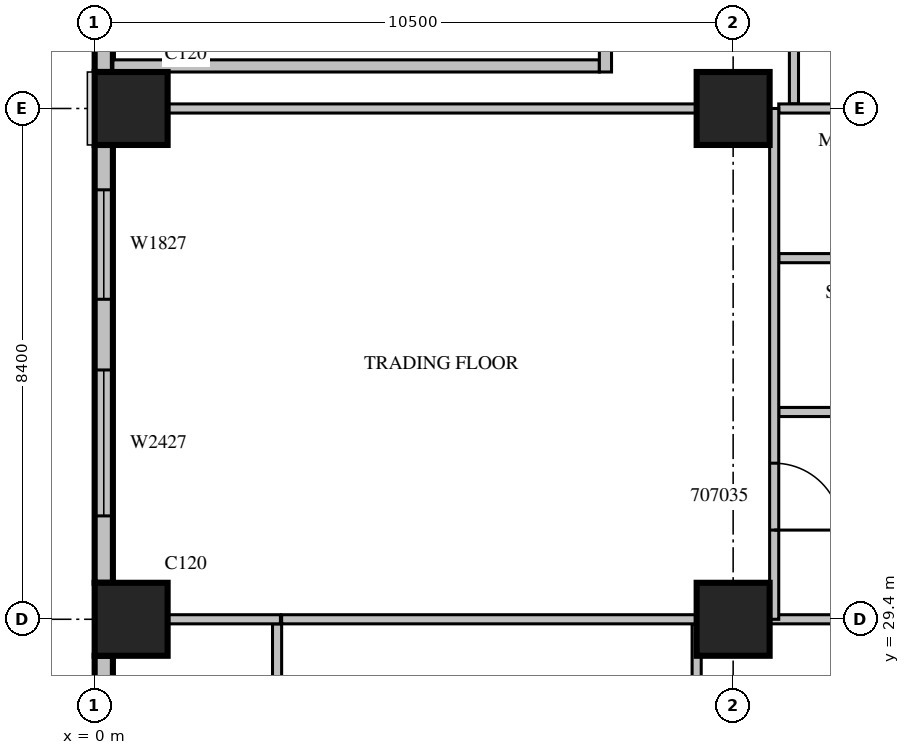
"""IFC4 building model, lengths in metres.
Left out: names, types, materials, properties, quantities, classifications, styles, units other than length and angle.
Written with IfcOpenShell. Run it as: python <this file> out.ifc"""

import sys

from ifc_helpers import new_model, si_unit, direction, frame, frame_2d, origin, origin_2d, place, context, subcontext, project, spatial, rectangle, extrude, source, transform, mapped, element, fill, save


model = new_model("IFC4")
c1 = context("Model", 3, precision=1e-05, world=origin(), true_north=direction((0.0, 1.0)))
c2 = subcontext(c1, "Body", "Model", "MODEL_VIEW")
j1 = project(units=[si_unit("LENGTHUNIT", "METRE"), si_unit("PLANEANGLEUNIT", "RADIAN")], contexts=[c1])
p1 = place(None, origin())
s1 = spatial("IfcSite", under=j1, at=p1, CompositionType="ELEMENT")
p2 = place(p1, origin())
s2 = spatial("IfcBuilding", under=s1, at=p2, CompositionType="ELEMENT")
p3 = place(p2, frame((0.0, 0.0, 40.5)))
s3 = spatial("IfcBuildingStorey", under=s2, at=p3, CompositionType="ELEMENT", Elevation=40.5)
m1 = source(origin(), c2, "Body", "SweptSolid", [
    extrude(rectangle(XDim=1.2, YDim=1.2, at=origin_2d()), origin(), (0.0, 0.0, 1.0), 4.2),
])
for number, where, z_axis, x_axis in (
    (1, (0.6, 29.4, 0.0), (0.0, 0.0, 1.0), (1.0, 0.0, 0.0)),
    (2, (10.5, 29.4, 0.0), (0.0, 0.0, 1.0), (1.0, 0.0, 0.0)),
    (3, (0.6, 37.8, 0.0), (0.0, 0.0, 1.0), (1.0, 0.0, 0.0)),
    (4, (10.5, 37.8, 0.0), (0.0, 0.0, 1.0), (1.0, 0.0, 0.0)),
):
    element("IfcColumn", number, at=place(p3, frame(where, z_axis=z_axis, x_axis=x_axis)), inside=s3, PredefinedType="COLUMN", context=c2, shape_type="MappedRepresentation", body=[
        mapped(m1, transform((0.0, 0.0, 0.0), scale=1.0)),
    ])
m2 = source(origin(), c2, "Body", "SweptSolid", [
    extrude(rectangle(XDim=1.8, YDim=0.3, at=frame_2d((0.9, 0.0))), origin(), (0.0, 0.0, 1.0), 3.8),
])
p4 = place(p3, frame((0.15, 40.2, 0.0), z_axis=(0.0, 0.0, 1.0), x_axis=(0.0, -1.0, 0.0)))
e5 = element("IfcWall", 5, at=p4, inside=s3, PredefinedType="STANDARD", context=c2, shape_type="MappedRepresentation", body=[
    mapped(m2, transform((0.0, 0.0, 0.0), scale=1.0)),
])
m3 = source(origin(), c2, "Body", "SweptSolid", [
    extrude(rectangle(XDim=7.2, YDim=0.3, at=frame_2d((3.6, 0.0))), origin(), (0.0, 0.0, 1.0), 3.8),
])
p5 = place(p3, frame((0.15, 37.2, 0.0), z_axis=(0.0, 0.0, 1.0), x_axis=(0.0, -1.0, 0.0)))
e6 = element("IfcWall", 6, at=p5, inside=s3, PredefinedType="STANDARD", context=c2, shape_type="MappedRepresentation", body=[
    mapped(m3, transform((0.0, 0.0, 0.0), scale=1.0)),
])
m4 = source(origin(), c2, "Body", "SweptSolid", [
    extrude(rectangle(XDim=1.8, YDim=2.7, at=frame_2d((0.9, 1.35))), frame((0.0, 0.16, 0.0), z_axis=(0.0, -1.0, 0.0), x_axis=(1.0, 0.0, 0.0)), (0.0, 0.0, 1.0), 0.32),
])
p6 = place(p5, frame((0.738, 0.0, 0.6)))
e7 = element("IfcOpeningElement", 7, at=p6, cuts=e6, PredefinedType="OPENING", context=c2, shape_type="MappedRepresentation", body=[
    mapped(m4, transform((0.0, 0.0, 0.0), scale=1.0)),
])
m5 = source(origin(), c2, "Body", "SweptSolid", [
    extrude(rectangle(XDim=2.4, YDim=2.7, at=frame_2d((1.2, 1.35))), frame((0.0, 0.16, 0.0), z_axis=(0.0, -1.0, 0.0), x_axis=(1.0, 0.0, 0.0)), (0.0, 0.0, 1.0), 0.32),
])
p7 = place(p5, frame((3.7, 0.0, 0.6)))
e8 = element("IfcOpeningElement", 8, at=p7, cuts=e6, PredefinedType="OPENING", context=c2, shape_type="MappedRepresentation", body=[
    mapped(m5, transform((0.0, 0.0, 0.0), scale=1.0)),
])
p8 = place(p3, frame((0.15, 28.8, 0.0), z_axis=(0.0, 0.0, 1.0), x_axis=(0.0, -1.0, 0.0)))
e9 = element("IfcWall", 9, at=p8, inside=s3, PredefinedType="STANDARD", context=c2, shape_type="SweptSolid", body=[
    extrude(rectangle(XDim=7.2, YDim=0.3, at=frame_2d((3.6, 0.0))), origin(), (0.0, 0.0, 1.0), 3.3),
])
m6 = source(origin(), c2, "Body", "SweptSolid", [
    extrude(rectangle(XDim=3.0, YDim=2.7, at=frame_2d((1.5, 1.35))), frame((0.0, 0.16, 0.0), z_axis=(0.0, -1.0, 0.0), x_axis=(1.0, 0.0, 0.0)), (0.0, 0.0, 1.0), 0.32),
])
p9 = place(p8, frame((1.68, 0.0, 0.6)))
e10 = element("IfcOpeningElement", 10, at=p9, cuts=e9, PredefinedType="OPENING", context=c2, shape_type="MappedRepresentation", body=[
    mapped(m6, transform((0.0, 0.0, 0.0), scale=1.0)),
])
m7 = source(origin(), c2, "Body", "SweptSolid", [
    extrude(rectangle(XDim=8.0, YDim=0.2, at=frame_2d((4.0, 0.0))), origin(), (0.0, 0.0, 1.0), 3.8),
])
p10 = place(p3, frame((0.3, 38.5, 0.0), z_axis=(0.0, 0.0, 1.0), x_axis=(1.0, 0.0, 0.0)))
e11 = element("IfcWall", 11, at=p10, inside=s3, PredefinedType="PARTITIONING", context=c2, shape_type="MappedRepresentation", body=[
    mapped(m7, transform((0.0, 0.0, 0.0), scale=1.0)),
])
m8 = source(origin(), c2, "Body", "SweptSolid", [
    extrude(rectangle(XDim=5.45, YDim=0.2, at=frame_2d((2.725, 0.0))), origin(), (0.0, 0.0, 1.0), 3.8),
])
p11 = place(p3, frame((8.4, 38.4, 0.0), z_axis=(0.0, 0.0, 1.0), x_axis=(0.0, 1.0, 0.0)))
e12 = element("IfcWall", 12, at=p11, inside=s3, PredefinedType="PARTITIONING", context=c2, shape_type="MappedRepresentation", body=[
    mapped(m8, transform((0.0, 0.0, 0.0), scale=1.0)),
])
m9 = source(origin(), c2, "Body", "SweptSolid", [
    extrude(rectangle(XDim=1.2, YDim=2.1, at=frame_2d((0.6, 1.05))), frame((0.0, 0.11, 0.0), z_axis=(0.0, -1.0, 0.0), x_axis=(1.0, 0.0, 0.0)), (0.0, 0.0, 1.0), 0.22),
])
p12 = place(p11, frame((0.4, 0.0, 0.0)))
e13 = element("IfcOpeningElement", 13, at=p12, cuts=e12, PredefinedType="OPENING", context=c2, shape_type="MappedRepresentation", body=[
    mapped(m9, transform((0.0, 0.0, 0.0), scale=1.0)),
])
m10 = source(origin(), c2, "Body", "SweptSolid", [
    extrude(rectangle(XDim=0.9, YDim=2.1, at=frame_2d((0.45, 1.05))), frame((0.0, 0.11, 0.0), z_axis=(0.0, -1.0, 0.0), x_axis=(1.0, 0.0, 0.0)), (0.0, 0.0, 1.0), 0.22),
])
p13 = place(p11, frame((3.25, 0.0, 0.0)))
e14 = element("IfcOpeningElement", 14, at=p13, cuts=e12, PredefinedType="OPENING", context=c2, shape_type="MappedRepresentation", body=[
    mapped(m10, transform((0.0, 0.0, 0.0), scale=1.0)),
])
p14 = place(p3, frame((9.9, 24.175, 0.0), z_axis=(0.0, 0.0, 1.0), x_axis=(0.0, 1.0, 0.0)))
e15 = element("IfcWall", 15, at=p14, inside=s3, PredefinedType="PARTITIONING", context=c2, shape_type="SweptSolid", body=[
    extrude(rectangle(XDim=5.15, YDim=0.15, at=frame_2d((2.575, 0.0))), origin(), (0.0, 0.0, 1.0), 3.3),
])
m11 = source(origin(), c2, "Body", "SweptSolid", [
    extrude(rectangle(XDim=6.826, YDim=0.15, at=frame_2d((3.413, 0.0))), origin(), (0.0, 0.0, 1.0), 3.8),
])
p15 = place(p3, frame((9.901, 29.4, 0.0), z_axis=(0.0, 0.0, 1.0), x_axis=(-1.0, 0.0, 0.0)))
e16 = element("IfcWall", 16, at=p15, inside=s3, PredefinedType="PARTITIONING", context=c2, shape_type="MappedRepresentation", body=[
    mapped(m11, transform((0.0, 0.0, 0.0), scale=1.0)),
])
m12 = source(origin(), c2, "Body", "SweptSolid", [
    extrude(rectangle(XDim=3.901, YDim=0.15, at=frame_2d((1.95, 0.0))), origin(), (0.0, 0.0, 1.0), 3.8),
])
p16 = place(p3, frame((15.0, 29.4, 0.0), z_axis=(0.0, 0.0, 1.0), x_axis=(-1.0, 0.0, 0.0)))
e17 = element("IfcWall", 17, at=p16, inside=s3, PredefinedType="PARTITIONING", context=c2, shape_type="MappedRepresentation", body=[
    mapped(m12, transform((0.0, 0.0, 0.0), scale=1.0)),
])
p17 = place(p3, frame((3.0, 29.325, 0.0), z_axis=(0.0, 0.0, 1.0), x_axis=(0.0, -1.0, 0.0)))
e18 = element("IfcWall", 18, at=p17, inside=s3, PredefinedType="PARTITIONING", context=c2, shape_type="SweptSolid", body=[
    extrude(rectangle(XDim=7.125, YDim=0.15, at=frame_2d((3.562, 0.0))), origin(), (0.0, 0.0, 1.0), 3.3),
])
m13 = source(origin(), c2, "Body", "SweptSolid", [
    extrude(rectangle(XDim=1.0, YDim=2.1, at=frame_2d((0.5, 1.05))), frame((0.0, 0.085, 0.0), z_axis=(0.0, -1.0, 0.0), x_axis=(1.0, 0.0, 0.0)), (0.0, 0.0, 1.0), 0.17),
])
p18 = place(p17, frame((5.675, 0.0, 0.0)))
e19 = element("IfcOpeningElement", 19, at=p18, cuts=e18, PredefinedType="OPENING", context=c2, shape_type="MappedRepresentation", body=[
    mapped(m13, transform((0.0, 0.0, 0.0), scale=1.0)),
])
m14 = source(origin(), c2, "Body", "SweptSolid", [
    extrude(rectangle(XDim=6.45, YDim=0.15, at=frame_2d((3.225, 0.0))), origin(), (0.0, 0.0, 1.0), 3.8),
])
p19 = place(p3, frame((11.5, 44.325, 0.0), z_axis=(0.0, 0.0, 1.0), x_axis=(0.0, -1.0, 0.0)))
e20 = element("IfcWall", 20, at=p19, inside=s3, PredefinedType="PARTITIONING", context=c2, shape_type="MappedRepresentation", body=[
    mapped(m14, transform((0.0, 0.0, 0.0), scale=1.0)),
])
m15 = source(origin(), c2, "Body", "SweptSolid", [
    extrude(rectangle(XDim=3.75, YDim=0.15, at=frame_2d((1.875, 0.0))), origin(), (0.0, 0.0, 1.0), 3.8),
])
for number, where, z_axis, x_axis in (
    (21, (15.0, 32.809, 0.0), (0.0, 0.0, 1.0), (-1.0, 0.0, 0.0)),
    (22, (15.0, 35.339, 0.0), (0.0, 0.0, 1.0), (-1.0, 0.0, 0.0)),
):
    element("IfcWall", number, at=place(p3, frame(where, z_axis=z_axis, x_axis=x_axis)), inside=s3, PredefinedType="PARTITIONING", context=c2, shape_type="MappedRepresentation", body=[
        mapped(m15, transform((0.0, 0.0, 0.0), scale=1.0)),
    ])
m16 = source(origin(), c2, "Body", "SweptSolid", [
    extrude(rectangle(XDim=1.856, YDim=0.15, at=frame_2d((0.928, 0.0))), origin(), (0.0, 0.0, 1.0), 3.8),
])
p20 = place(p3, frame((3.055, 29.4, 0.0), z_axis=(0.0, 0.0, 1.0), x_axis=(-1.0, 0.0, 0.0)))
e23 = element("IfcWall", 23, at=p20, inside=s3, PredefinedType="PARTITIONING", context=c2, shape_type="MappedRepresentation", body=[
    mapped(m16, transform((0.0, 0.0, 0.0), scale=1.0)),
])
m17 = source(origin(), c2, "Body", "SweptSolid", [
    extrude(rectangle(XDim=8.702, YDim=0.15, at=frame_2d((4.351, 0.0))), origin(), (0.0, 0.0, 1.0), 3.8),
])
p21 = place(p3, frame((9.901, 37.8, 0.0), z_axis=(0.0, 0.0, 1.0), x_axis=(-1.0, 0.0, 0.0)))
e24 = element("IfcWall", 24, at=p21, inside=s3, PredefinedType="PARTITIONING", context=c2, shape_type="MappedRepresentation", body=[
    mapped(m17, transform((0.0, 0.0, 0.0), scale=1.0)),
])
p22 = place(p3, frame((15.0, 37.8, 0.0), z_axis=(0.0, 0.0, 1.0), x_axis=(-1.0, 0.0, 0.0)))
e25 = element("IfcWall", 25, at=p22, inside=s3, PredefinedType="PARTITIONING", context=c2, shape_type="MappedRepresentation", body=[
    mapped(m15, transform((0.0, 0.0, 0.0), scale=1.0)),
])
m18 = source(origin(), c2, "Body", "SweptSolid", [
    extrude(rectangle(XDim=8.4, YDim=0.15, at=frame_2d((4.2, 0.0))), origin(), (0.0, 0.0, 1.0), 3.8),
])
p23 = place(p3, frame((11.175, 29.4, 0.0), z_axis=(0.0, 0.0, 1.0), x_axis=(0.0, 1.0, 0.0)))
e26 = element("IfcWall", 26, at=p23, inside=s3, PredefinedType="PARTITIONING", context=c2, shape_type="MappedRepresentation", body=[
    mapped(m18, transform((0.0, 0.0, 0.0), scale=1.0)),
])
m19 = source(origin(), c2, "Body", "SweptSolid", [
    extrude(rectangle(XDim=1.1, YDim=2.1, at=frame_2d((0.55, 1.05))), frame((0.0, 0.085, 0.0), z_axis=(0.0, -1.0, 0.0), x_axis=(1.0, 0.0, 0.0)), (0.0, 0.0, 1.0), 0.17),
])
p24 = place(p23, frame((1.467, 0.0, 0.0)))
e27 = element("IfcOpeningElement", 27, at=p24, cuts=e26, PredefinedType="OPENING", context=c2, shape_type="MappedRepresentation", body=[
    mapped(m19, transform((0.0, 0.0, 0.0), scale=1.0)),
])
m20 = source(origin(), c2, "Body", "SweptSolid", [
    extrude(rectangle(XDim=1.8, YDim=2.7, at=frame_2d((0.9, 1.35))), frame((0.0, 0.03, 0.0), z_axis=(0.0, -1.0, 0.0), x_axis=(1.0, 0.0, 0.0)), (0.0, 0.0, 1.0), 0.06),
])
p25 = place(p6, origin())
e28 = element("IfcWindow", 28, at=p25, inside=s3, PartitioningType="SINGLE_PANEL", PredefinedType="WINDOW", context=c2, shape_type="MappedRepresentation", body=[
    mapped(m20, transform((0.0, 0.0, 0.0), scale=1.0)),
])
fill(e7, e28)
m21 = source(origin(), c2, "Body", "SweptSolid", [
    extrude(rectangle(XDim=2.4, YDim=2.7, at=frame_2d((1.2, 1.35))), frame((0.0, 0.03, 0.0), z_axis=(0.0, -1.0, 0.0), x_axis=(1.0, 0.0, 0.0)), (0.0, 0.0, 1.0), 0.06),
])
p26 = place(p7, origin())
e29 = element("IfcWindow", 29, at=p26, inside=s3, PartitioningType="SINGLE_PANEL", PredefinedType="WINDOW", context=c2, shape_type="MappedRepresentation", body=[
    mapped(m21, transform((0.0, 0.0, 0.0), scale=1.0)),
])
fill(e8, e29)
m22 = source(origin(), c2, "Body", "SweptSolid", [
    extrude(rectangle(XDim=1.1, YDim=2.1, at=frame_2d((0.55, 1.05))), frame((0.0, 0.025, 0.0), z_axis=(0.0, -1.0, 0.0), x_axis=(1.0, 0.0, 0.0)), (0.0, 0.0, 1.0), 0.05),
])
p27 = place(p24, origin())
e30 = element("IfcDoor", 30, at=p27, inside=s3, OperationType="SINGLE_SWING_RIGHT", PredefinedType="DOOR", context=c2, shape_type="MappedRepresentation", body=[
    mapped(m22, transform((0.0, 0.0, 0.0), scale=1.0)),
])
fill(e27, e30)
save(model, sys.argv[1])
